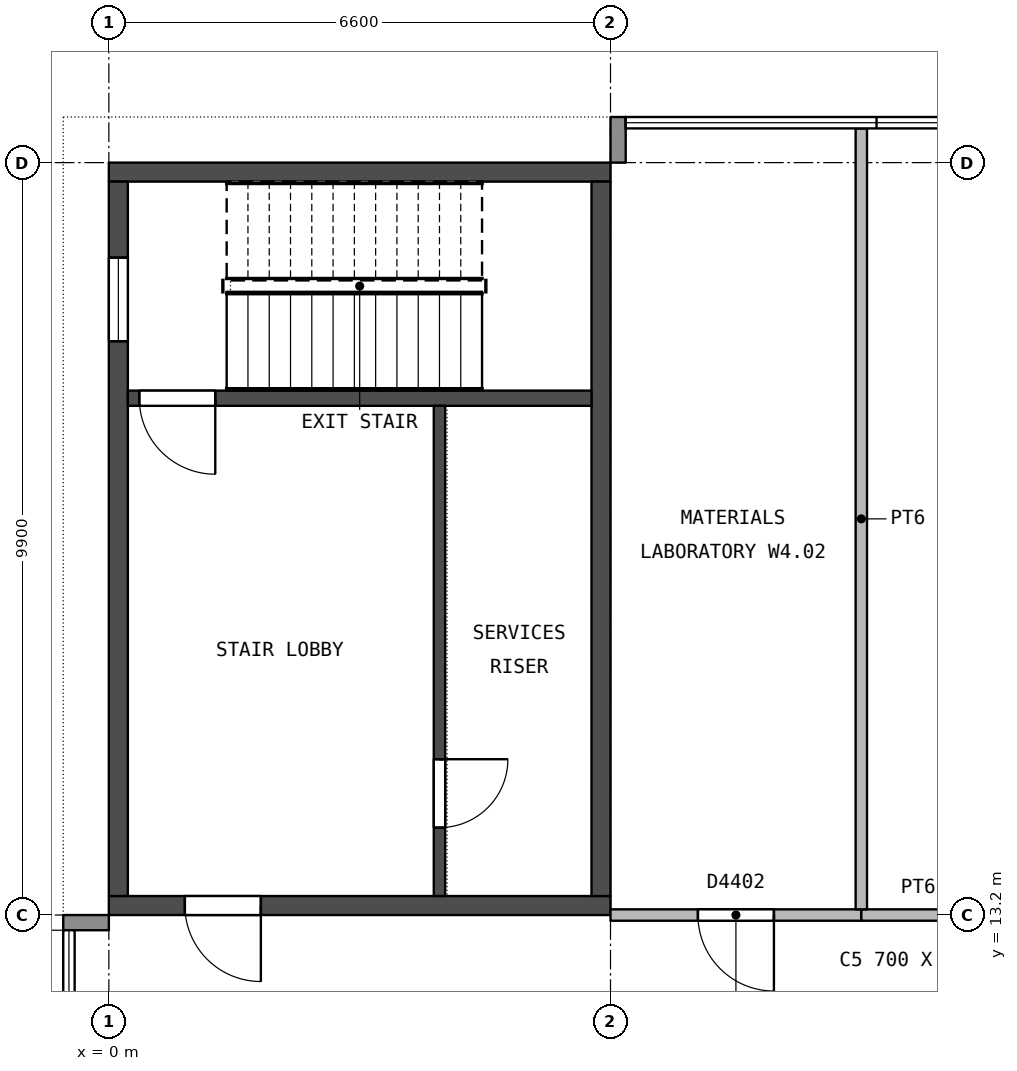
"""IFC4 building model, lengths in metres.
Left out: names, types, materials, properties, quantities, classifications, styles, units other than length and angle.
Written with IfcOpenShell. Run it as: python <this file> out.ifc"""

import sys

from ifc_helpers import new_model, si_unit, direction, frame, frame_2d, origin, place, context, subcontext, project, spatial, rectangle, extrude, element, fill, save


model = new_model("IFC4")
c1 = context("Model", 3, precision=1e-05, world=origin(), true_north=direction((0.0, 1.0)))
c2 = subcontext(c1, "Body", "Model", "MODEL_VIEW")
j1 = project(units=[si_unit("LENGTHUNIT", "METRE"), si_unit("PLANEANGLEUNIT", "RADIAN")], contexts=[c1])
p1 = place(None, origin())
s1 = spatial("IfcSite", under=j1, at=p1, CompositionType="ELEMENT")
p2 = place(p1, origin())
s2 = spatial("IfcBuilding", under=s1, at=p2, CompositionType="ELEMENT")
p3 = place(p2, frame((0.0, 0.0, 18.9)))
s3 = spatial("IfcBuildingStorey", under=s2, at=p3, CompositionType="ELEMENT", Elevation=18.9)
p4 = place(p3, frame((0.0, 13.325, 0.0), z_axis=(0.0, 0.0, 1.0), x_axis=(1.0, 0.0, 0.0)))
e1 = element("IfcWall", 1, at=p4, inside=s3, PredefinedType="SHEAR", context=c2, shape_type="SweptSolid", body=[
    extrude(rectangle(XDim=6.6, YDim=0.25, at=frame_2d((3.3, 0.0))), origin(), (0.0, 0.0, 1.0), 4.2),
])
p5 = place(p4, frame((1.0, 0.0, 0.0)))
e2 = element("IfcOpeningElement", 2, at=p5, cuts=e1, PredefinedType="OPENING", context=c2, shape_type="SweptSolid", body=[
    extrude(rectangle(XDim=1.0, YDim=2.1, at=frame_2d((0.5, 1.05))), frame((0.0, 0.135, 0.0), z_axis=(0.0, -1.0, 0.0), x_axis=(1.0, 0.0, 0.0)), (0.0, 0.0, 1.0), 0.27),
])
p6 = place(p3, frame((0.0, 22.975, 0.0), z_axis=(0.0, 0.0, 1.0), x_axis=(1.0, 0.0, 0.0)))
e3 = element("IfcWall", 3, at=p6, inside=s3, PredefinedType="SHEAR", context=c2, shape_type="SweptSolid", body=[
    extrude(rectangle(XDim=6.6, YDim=0.25, at=frame_2d((3.3, 0.0))), origin(), (0.0, 0.0, 1.0), 4.2),
])
p7 = place(p3, frame((0.125, 13.45, 0.0), z_axis=(0.0, 0.0, 1.0), x_axis=(0.0, 1.0, 0.0)))
e4 = element("IfcWall", 4, at=p7, inside=s3, PredefinedType="SHEAR", context=c2, shape_type="SweptSolid", body=[
    extrude(rectangle(XDim=9.4, YDim=0.25, at=frame_2d((4.7, 0.0))), origin(), (0.0, 0.0, 1.0), 4.2),
])
p8 = place(p7, frame((7.3, 0.0, 0.7)))
e5 = element("IfcOpeningElement", 5, at=p8, cuts=e4, PredefinedType="OPENING", context=c2, shape_type="SweptSolid", body=[
    extrude(rectangle(XDim=1.1, YDim=1.5, at=frame_2d((0.55, 0.75))), frame((0.0, 0.135, 0.0), z_axis=(0.0, -1.0, 0.0), x_axis=(1.0, 0.0, 0.0)), (0.0, 0.0, 1.0), 0.27),
])
p9 = place(p3, frame((6.475, 13.45, 0.0), z_axis=(0.0, 0.0, 1.0), x_axis=(0.0, 1.0, 0.0)))
e6 = element("IfcWall", 6, at=p9, inside=s3, PredefinedType="SHEAR", context=c2, shape_type="SweptSolid", body=[
    extrude(rectangle(XDim=9.4, YDim=0.25, at=frame_2d((4.7, 0.0))), origin(), (0.0, 0.0, 1.0), 4.2),
])
p10 = place(p3, frame((0.25, 20.0, 0.0), z_axis=(0.0, 0.0, 1.0), x_axis=(1.0, 0.0, 0.0)))
e7 = element("IfcWall", 7, at=p10, inside=s3, PredefinedType="SHEAR", context=c2, shape_type="SweptSolid", body=[
    extrude(rectangle(XDim=6.1, YDim=0.2, at=frame_2d((3.05, 0.0))), origin(), (0.0, 0.0, 1.0), 4.2),
])
p11 = place(p10, frame((0.15, 0.0, 0.0)))
e8 = element("IfcOpeningElement", 8, at=p11, cuts=e7, PredefinedType="OPENING", context=c2, shape_type="SweptSolid", body=[
    extrude(rectangle(XDim=1.0, YDim=2.1, at=frame_2d((0.5, 1.05))), frame((0.0, 0.11, 0.0), z_axis=(0.0, -1.0, 0.0), x_axis=(1.0, 0.0, 0.0)), (0.0, 0.0, 1.0), 0.22),
])
p12 = place(p3, frame((4.35, 13.45, 0.0), z_axis=(0.0, 0.0, 1.0), x_axis=(0.0, 1.0, 0.0)))
e9 = element("IfcWall", 9, at=p12, inside=s3, PredefinedType="SHEAR", context=c2, shape_type="SweptSolid", body=[
    extrude(rectangle(XDim=6.45, YDim=0.15, at=frame_2d((3.225, 0.0))), origin(), (0.0, 0.0, 1.0), 4.2),
])
p13 = place(p12, frame((0.9, 0.0, 0.0)))
e10 = element("IfcOpeningElement", 10, at=p13, cuts=e9, PredefinedType="OPENING", context=c2, shape_type="SweptSolid", body=[
    extrude(rectangle(XDim=0.9, YDim=2.1, at=frame_2d((0.45, 1.05))), frame((0.0, 0.085, 0.0), z_axis=(0.0, -1.0, 0.0), x_axis=(1.0, 0.0, 0.0)), (0.0, 0.0, 1.0), 0.17),
])
p14 = place(p3, frame((6.7, 23.1, 0.0), z_axis=(0.0, 0.0, 1.0), x_axis=(0.0, 1.0, 0.0)))
e11 = element("IfcWall", 11, at=p14, inside=s3, PredefinedType="STANDARD", context=c2, shape_type="SweptSolid", body=[
    extrude(rectangle(XDim=0.6, YDim=0.2, at=frame_2d((0.3, 0.0))), origin(), (0.0, 0.0, 1.0), 3.5),
])
p15 = place(p3, frame((0.0, 13.1, 0.0), z_axis=(0.0, 0.0, 1.0), x_axis=(-1.0, 0.0, 0.0)))
e12 = element("IfcWall", 12, at=p15, inside=s3, PredefinedType="STANDARD", context=c2, shape_type="SweptSolid", body=[
    extrude(rectangle(XDim=0.6, YDim=0.2, at=frame_2d((0.3, 0.0))), origin(), (0.0, 0.0, 1.0), 3.5),
])
p16 = place(p3, frame((9.9, 13.2, 0.0), z_axis=(0.0, 0.0, 1.0), x_axis=(-1.0, 0.0, 0.0)))
e13 = element("IfcWall", 13, at=p16, inside=s3, PredefinedType="PARTITIONING", context=c2, shape_type="SweptSolid", body=[
    extrude(rectangle(XDim=3.3, YDim=0.15, at=frame_2d((1.65, 0.0))), origin(), (0.0, 0.0, 1.0), 3.5),
])
p17 = place(p16, frame((1.15, 0.0, 0.0)))
e14 = element("IfcOpeningElement", 14, at=p17, cuts=e13, PredefinedType="OPENING", context=c2, shape_type="SweptSolid", body=[
    extrude(rectangle(XDim=1.0, YDim=2.1, at=frame_2d((0.5, 1.05))), frame((0.0, 0.085, 0.0), z_axis=(0.0, -1.0, 0.0), x_axis=(1.0, 0.0, 0.0)), (0.0, 0.0, 1.0), 0.17),
])
p18 = place(p3, frame((12.85, 13.2, 0.0), z_axis=(0.0, 0.0, 1.0), x_axis=(-1.0, 0.0, 0.0)))
e15 = element("IfcWall", 15, at=p18, inside=s3, PredefinedType="PARTITIONING", context=c2, shape_type="SweptSolid", body=[
    extrude(rectangle(XDim=2.95, YDim=0.15, at=frame_2d((1.475, 0.0))), origin(), (0.0, 0.0, 1.0), 3.5),
])
p19 = place(p3, frame((9.9, 13.275, 0.0), z_axis=(0.0, 0.0, 1.0), x_axis=(0.0, 1.0, 0.0)))
e16 = element("IfcWall", 16, at=p19, inside=s3, PredefinedType="PARTITIONING", context=c2, shape_type="SweptSolid", body=[
    extrude(rectangle(XDim=10.275, YDim=0.15, at=frame_2d((5.138, 0.0))), origin(), (0.0, 0.0, 1.0), 4.2),
])
p20 = place(p13, origin())
e17 = element("IfcDoor", 17, at=p20, inside=s3, OperationType="SINGLE_SWING_RIGHT", PredefinedType="DOOR", context=c2, shape_type="SweptSolid", body=[
    extrude(rectangle(XDim=0.9, YDim=2.1, at=frame_2d((0.45, 1.05))), frame((0.0, 0.025, 0.0), z_axis=(0.0, -1.0, 0.0), x_axis=(1.0, 0.0, 0.0)), (0.0, 0.0, 1.0), 0.05),
])
fill(e10, e17)
p21 = place(p5, origin())
e18 = element("IfcDoor", 18, at=p21, inside=s3, OperationType="SINGLE_SWING_RIGHT", PredefinedType="DOOR", context=c2, shape_type="SweptSolid", body=[
    extrude(rectangle(XDim=1.0, YDim=2.1, at=frame_2d((0.5, 1.05))), frame((0.0, 0.025, 0.0), z_axis=(0.0, -1.0, 0.0), x_axis=(1.0, 0.0, 0.0)), (0.0, 0.0, 1.0), 0.05),
])
fill(e2, e18)
p22 = place(p11, origin())
e19 = element("IfcDoor", 19, at=p22, inside=s3, OperationType="SINGLE_SWING_RIGHT", PredefinedType="DOOR", context=c2, shape_type="SweptSolid", body=[
    extrude(rectangle(XDim=1.0, YDim=2.1, at=frame_2d((0.5, 1.05))), frame((0.0, 0.025, 0.0), z_axis=(0.0, -1.0, 0.0), x_axis=(1.0, 0.0, 0.0)), (0.0, 0.0, 1.0), 0.05),
])
fill(e8, e19)
p23 = place(p8, origin())
e20 = element("IfcWindow", 20, at=p23, inside=s3, PartitioningType="SINGLE_PANEL", PredefinedType="WINDOW", context=c2, shape_type="SweptSolid", body=[
    extrude(rectangle(XDim=1.1, YDim=1.5, at=frame_2d((0.55, 0.75))), frame((0.0, 0.03, 0.0), z_axis=(0.0, -1.0, 0.0), x_axis=(1.0, 0.0, 0.0)), (0.0, 0.0, 1.0), 0.06),
])
fill(e5, e20)
p24 = place(p17, origin())
e21 = element("IfcDoor", 21, at=p24, inside=s3, OperationType="SINGLE_SWING_LEFT", PredefinedType="DOOR", context=c2, shape_type="SweptSolid", body=[
    extrude(rectangle(XDim=1.0, YDim=2.1, at=frame_2d((0.5, 1.05))), frame((0.0, 0.027, 0.0), z_axis=(0.0, -1.0, 0.0), x_axis=(1.0, 0.0, 0.0)), (0.0, 0.0, 1.0), 0.054),
])
fill(e14, e21)
save(model, sys.argv[1])
